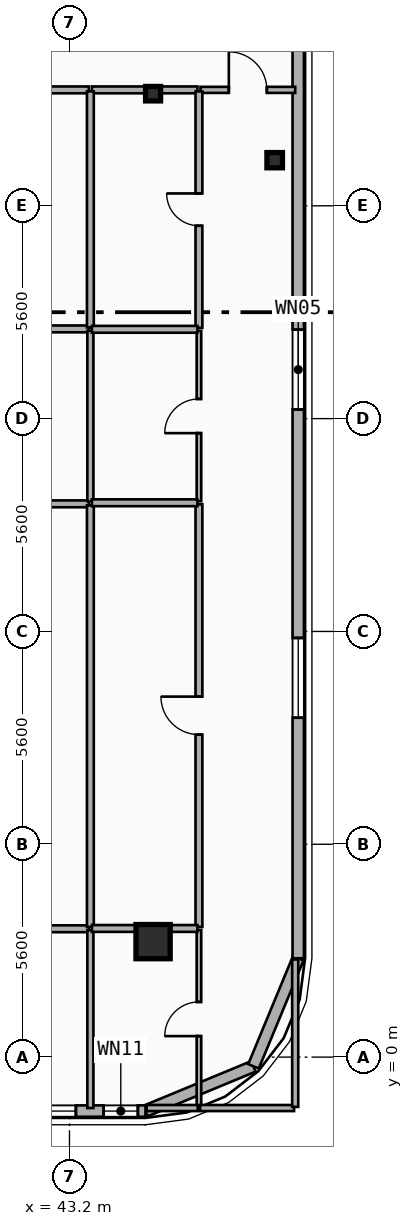
"""IFC4 building model, lengths in metres.
Left out: names, types, materials, properties, quantities, classifications, styles, units other than length and angle.
Written with IfcOpenShell. Run it as: python <this file> out.ifc"""

import sys

from ifc_helpers import new_model, si_unit, direction, frame, frame_2d, origin, origin_2d, place, context, subcontext, project, spatial, rectangle, i_section, extrude, element, fill, save


model = new_model("IFC4")
c1 = context("Model", 3, precision=1e-05, world=origin(), true_north=direction((0.0, 1.0)))
c2 = subcontext(c1, "Body", "Model", "MODEL_VIEW")
j1 = project(units=[si_unit("LENGTHUNIT", "METRE"), si_unit("PLANEANGLEUNIT", "RADIAN")], contexts=[c1])
p1 = place(None, origin())
s1 = spatial("IfcSite", under=j1, at=p1, CompositionType="ELEMENT")
p2 = place(p1, origin())
s2 = spatial("IfcBuilding", under=s1, at=p2, CompositionType="ELEMENT")
p3 = place(p2, frame((0.0, 0.0, 254.7)))
s3 = spatial("IfcBuildingStorey", under=s2, at=p3, CompositionType="ELEMENT", Elevation=254.7)
p4 = place(p3, frame((45.4, 25.35, 0.0), z_axis=(0.0, 0.0, 1.0), x_axis=(1.0, 0.0, 0.0)))
e1 = element("IfcColumn", 1, at=p4, inside=s3, PredefinedType="COLUMN", context=c2, shape_type="SweptSolid", body=[
    extrude(i_section(OverallWidth=0.395, OverallDepth=0.38, WebThickness=0.019, FlangeThickness=0.03, FilletRadius=0.015, at=origin_2d()), origin(), (0.0, 0.0, 1.0), 3.7),
])
p5 = place(p3, frame((45.4, 3.147, 0.0), z_axis=(0.0, -0.090292812226, 0.995915261486), x_axis=(1.0, 0.0, 0.0)))
e2 = element("IfcColumn", 2, at=p5, inside=s3, PredefinedType="COLUMN", context=c2, shape_type="SweptSolid", body=[
    extrude(rectangle(XDim=0.9, YDim=0.9, at=origin_2d()), origin(), (0.0, 0.0, 1.0), 3.715),
])
p6 = place(p3, frame((48.6, 23.6, 0.0), z_axis=(0.0, 0.0, 1.0), x_axis=(1.0, 0.0, 0.0)))
e3 = element("IfcColumn", 3, at=p6, inside=s3, PredefinedType="COLUMN", context=c2, shape_type="SweptSolid", body=[
    extrude(i_section(OverallWidth=0.408, OverallDepth=0.4, WebThickness=0.025, FlangeThickness=0.039, FilletRadius=0.015, at=origin_2d()), origin(), (0.0, 0.0, 1.0), 3.7),
])
p7 = place(p3, frame((48.042, -0.243, 0.0), z_axis=(0.0, 0.0, 1.0), x_axis=(-0.92389884758, -0.382636798336, 0.0)))
e4 = element("IfcWall", 4, at=p7, inside=s3, PredefinedType="SOLIDWALL", context=c2, shape_type="SweptSolid", body=[
    extrude(rectangle(XDim=3.077, YDim=0.3, at=frame_2d((1.538, 0.0))), origin(), (0.0, 0.0, 1.0), 3.42),
])
p8 = place(p3, frame((49.22, 2.6, 0.0), z_axis=(0.0, 0.0, 1.0), x_axis=(-0.382676475685, -0.923882414032, 0.0)))
e5 = element("IfcWall", 5, at=p8, inside=s3, PredefinedType="SOLIDWALL", context=c2, shape_type="SweptSolid", body=[
    extrude(rectangle(XDim=3.077, YDim=0.3, at=frame_2d((1.539, 0.0))), origin(), (0.0, 0.0, 1.0), 3.42),
])
p9 = place(p3, frame((49.22, 36.8, 0.0), z_axis=(0.0, 0.0, 1.0), x_axis=(0.0, -1.0, 0.0)))
e6 = element("IfcWall", 6, at=p9, inside=s3, PredefinedType="SOLIDWALL", context=c2, shape_type="SweptSolid", body=[
    extrude(rectangle(XDim=34.2, YDim=0.3, at=frame_2d((17.1, 0.0))), origin(), (0.0, 0.0, 1.0), 3.42),
])
p10 = place(p9, frame((17.66, 0.0, 0.75)))
e7 = element("IfcOpeningElement", 7, at=p10, cuts=e6, PredefinedType="OPENING", context=c2, shape_type="SweptSolid", body=[
    extrude(rectangle(XDim=2.1, YDim=2.1, at=frame_2d((1.05, 1.05))), frame((0.0, 0.16, 0.0), z_axis=(0.0, -1.0, 0.0), x_axis=(1.0, 0.0, 0.0)), (0.0, 0.0, 1.0), 0.32),
])
p11 = place(p9, frame((25.77, 0.0, 0.75)))
e8 = element("IfcOpeningElement", 8, at=p11, cuts=e6, PredefinedType="OPENING", context=c2, shape_type="SweptSolid", body=[
    extrude(rectangle(XDim=2.1, YDim=2.1, at=frame_2d((1.05, 1.05))), frame((0.0, 0.16, 0.0), z_axis=(0.0, -1.0, 0.0), x_axis=(1.0, 0.0, 0.0)), (0.0, 0.0, 1.0), 0.32),
])
p12 = place(p3, frame((45.2, -1.42, 0.0), z_axis=(0.0, 0.0, 1.0), x_axis=(-1.0, 0.0, 0.0)))
e9 = element("IfcWall", 9, at=p12, inside=s3, PredefinedType="SOLIDWALL", context=c2, shape_type="SweptSolid", body=[
    extrude(rectangle(XDim=32.8, YDim=0.3, at=frame_2d((16.4, 0.0))), origin(), (0.0, 0.0, 1.0), 3.42),
])
p13 = place(p12, frame((26.77, 0.0, 0.75)))
e10 = element("IfcOpeningElement", 10, at=p13, cuts=e9, PredefinedType="OPENING", context=c2, shape_type="SweptSolid", body=[
    extrude(rectangle(XDim=1.6, YDim=1.95, at=frame_2d((0.8, 0.975))), frame((0.0, 0.16, 0.0), z_axis=(0.0, -1.0, 0.0), x_axis=(1.0, 0.0, 0.0)), (0.0, 0.0, 1.0), 0.32),
])
p14 = place(p12, frame((29.115, 0.0, 0.75)))
e11 = element("IfcOpeningElement", 11, at=p14, cuts=e9, PredefinedType="OPENING", context=c2, shape_type="SweptSolid", body=[
    extrude(rectangle(XDim=2.1, YDim=2.1, at=frame_2d((1.05, 1.05))), frame((0.0, 0.16, 0.0), z_axis=(0.0, -1.0, 0.0), x_axis=(1.0, 0.0, 0.0)), (0.0, 0.0, 1.0), 0.32),
])
p15 = place(p12, frame((15.75, 0.0, 0.75)))
e12 = element("IfcOpeningElement", 12, at=p15, cuts=e9, PredefinedType="OPENING", context=c2, shape_type="SweptSolid", body=[
    extrude(rectangle(XDim=2.1, YDim=2.1, at=frame_2d((1.05, 1.05))), frame((0.0, 0.16, 0.0), z_axis=(0.0, -1.0, 0.0), x_axis=(1.0, 0.0, 0.0)), (0.0, 0.0, 1.0), 0.32),
])
p16 = place(p12, frame((4.681, 0.0, 0.8)))
e13 = element("IfcOpeningElement", 13, at=p16, cuts=e9, PredefinedType="OPENING", context=c2, shape_type="SweptSolid", body=[
    extrude(rectangle(XDim=1.8, YDim=1.8, at=frame_2d((0.9, 0.9))), frame((0.0, 0.16, 0.0), z_axis=(0.0, -1.0, 0.0), x_axis=(1.0, 0.0, 0.0)), (0.0, 0.0, 1.0), 0.32),
])
p17 = place(p12, frame((1.831, 0.0, 0.75)))
e14 = element("IfcOpeningElement", 14, at=p17, cuts=e9, PredefinedType="OPENING", context=c2, shape_type="SweptSolid", body=[
    extrude(rectangle(XDim=2.1, YDim=2.1, at=frame_2d((1.05, 1.05))), frame((0.0, 0.16, 0.0), z_axis=(0.0, -1.0, 0.0), x_axis=(1.0, 0.0, 0.0)), (0.0, 0.0, 1.0), 0.32),
])
p18 = place(p12, frame((0.2, 0.0, 0.9)))
e15 = element("IfcOpeningElement", 15, at=p18, cuts=e9, PredefinedType="OPENING", context=c2, shape_type="SweptSolid", body=[
    extrude(rectangle(XDim=0.9, YDim=1.05, at=frame_2d((0.45, 0.525))), frame((0.0, 0.16, 0.0), z_axis=(0.0, -1.0, 0.0), x_axis=(1.0, 0.0, 0.0)), (0.0, 0.0, 1.0), 0.32),
])
p19 = place(p12, frame((31.76, 0.0, 0.9)))
e16 = element("IfcOpeningElement", 16, at=p19, cuts=e9, PredefinedType="OPENING", context=c2, shape_type="SweptSolid", body=[
    extrude(rectangle(XDim=0.9, YDim=1.05, at=frame_2d((0.45, 0.525))), frame((0.0, 0.16, 0.0), z_axis=(0.0, -1.0, 0.0), x_axis=(1.0, 0.0, 0.0)), (0.0, 0.0, 1.0), 0.32),
])
p20 = place(p3, frame((40.928, 25.45, 0.0), z_axis=(0.0, 0.0, 1.0), x_axis=(1.0, 0.0, 0.0)))
e17 = element("IfcWall", 17, at=p20, inside=s3, PredefinedType="PLUMBINGWALL", context=c2, shape_type="SweptSolid", body=[
    extrude(rectangle(XDim=2.782, YDim=0.18, at=frame_2d((1.391, 0.0))), origin(), (0.0, 0.0, 1.0), 3.42),
])
p21 = place(p3, frame((46.647, 25.45, 0.0), z_axis=(0.0, 0.0, 1.0), x_axis=(1.0, 0.0, 0.0)))
e18 = element("IfcWall", 18, at=p21, inside=s3, PredefinedType="PARTITIONING", context=c2, shape_type="SweptSolid", body=[
    extrude(rectangle(XDim=2.493, YDim=0.16, at=frame_2d((1.247, 0.0))), origin(), (0.0, 0.0, 1.0), 3.42),
])
p22 = place(p21, frame((0.747, 0.0, 0.0)))
e19 = element("IfcOpeningElement", 19, at=p22, cuts=e18, PredefinedType="OPENING", context=c2, shape_type="SweptSolid", body=[
    extrude(rectangle(XDim=1.0, YDim=2.15, at=frame_2d((0.5, 1.075))), frame((0.0, 0.09, 0.0), z_axis=(0.0, -1.0, 0.0), x_axis=(1.0, 0.0, 0.0)), (0.0, 0.0, 1.0), 0.18),
])
p23 = place(p3, frame((43.79, 25.45, 0.0), z_axis=(0.0, 0.0, 1.0), x_axis=(1.0, 0.0, 0.0)))
e20 = element("IfcWall", 20, at=p23, inside=s3, PredefinedType="PLUMBINGWALL", context=c2, shape_type="SweptSolid", body=[
    extrude(rectangle(XDim=2.777, YDim=0.18, at=frame_2d((1.388, 0.0))), origin(), (0.0, 0.0, 1.0), 2.7),
])
p24 = place(p3, frame((40.928, 3.377, 0.0), z_axis=(0.0, 0.0, 1.0), x_axis=(1.0, 0.0, 0.0)))
e21 = element("IfcWall", 21, at=p24, inside=s3, PredefinedType="PLUMBINGWALL", context=c2, shape_type="SweptSolid", body=[
    extrude(rectangle(XDim=2.782, YDim=0.18, at=frame_2d((1.391, 0.0))), origin(), (0.0, 0.0, 1.0), 3.08),
])
p25 = place(p3, frame((43.75, -1.34, 0.0), z_axis=(0.0, 0.0, 1.0), x_axis=(0.0, 1.0, 0.0)))
e22 = element("IfcWall", 22, at=p25, inside=s3, PredefinedType="PARTITIONING", context=c2, shape_type="SweptSolid", body=[
    extrude(rectangle(XDim=4.677, YDim=0.16, at=frame_2d((2.338, 0.0))), origin(), (0.0, 0.0, 1.0), 3.08),
])
p26 = place(p3, frame((40.928, 14.558, 0.0), z_axis=(0.0, 0.0, 1.0), x_axis=(1.0, 0.0, 0.0)))
e23 = element("IfcWall", 23, at=p26, inside=s3, PredefinedType="PLUMBINGWALL", context=c2, shape_type="SweptSolid", body=[
    extrude(rectangle(XDim=2.782, YDim=0.18, at=frame_2d((1.391, 0.0))), origin(), (0.0, 0.0, 1.0), 2.9),
])
p27 = place(p3, frame((43.75, 3.425, 0.0), z_axis=(0.0, 0.0, 1.0), x_axis=(0.0, 1.0, 0.0)))
e24 = element("IfcWall", 24, at=p27, inside=s3, PredefinedType="PLUMBINGWALL", context=c2, shape_type="SweptSolid", body=[
    extrude(rectangle(XDim=11.093, YDim=0.18, at=frame_2d((5.546, 0.0))), origin(), (0.0, 0.0, 1.0), 2.9),
])
p28 = place(p3, frame((40.928, 19.161, 0.0), z_axis=(0.0, 0.0, 1.0), x_axis=(1.0, 0.0, 0.0)))
e25 = element("IfcWall", 25, at=p28, inside=s3, PredefinedType="PLUMBINGWALL", context=c2, shape_type="SweptSolid", body=[
    extrude(rectangle(XDim=2.782, YDim=0.18, at=frame_2d((1.391, 0.0))), origin(), (0.0, 0.0, 1.0), 2.91),
])
p29 = place(p3, frame((43.75, 14.626, 0.0), z_axis=(0.0, 0.0, 1.0), x_axis=(0.0, 1.0, 0.0)))
e26 = element("IfcWall", 26, at=p29, inside=s3, PredefinedType="PARTITIONING", context=c2, shape_type="SweptSolid", body=[
    extrude(rectangle(XDim=4.484, YDim=0.16, at=frame_2d((2.242, 0.0))), origin(), (0.0, 0.0, 1.0), 2.9),
])
p30 = place(p3, frame((43.75, 19.201, 0.0), z_axis=(0.0, 0.0, 1.0), x_axis=(0.0, 1.0, 0.0)))
e27 = element("IfcWall", 27, at=p30, inside=s3, PredefinedType="PLUMBINGWALL", context=c2, shape_type="SweptSolid", body=[
    extrude(rectangle(XDim=6.209, YDim=0.18, at=frame_2d((3.104, 0.0))), origin(), (0.0, 0.0, 1.0), 2.9),
])
p31 = place(p3, frame((46.607, -1.34, 0.0), z_axis=(0.0, 0.0, 1.0), x_axis=(0.0, 1.0, 0.0)))
e28 = element("IfcWall", 28, at=p31, inside=s3, PredefinedType="PARTITIONING", context=c2, shape_type="SweptSolid", body=[
    extrude(rectangle(XDim=4.685, YDim=0.12, at=frame_2d((2.343, 0.0))), origin(), (0.0, 0.0, 1.0), 3.42),
])
p32 = place(p31, frame((1.893, 0.0, 0.0)))
e29 = element("IfcOpeningElement", 29, at=p32, cuts=e28, PredefinedType="OPENING", context=c2, shape_type="SweptSolid", body=[
    extrude(rectangle(XDim=0.9, YDim=2.1, at=frame_2d((0.45, 1.05))), frame((0.0, 0.07, 0.0), z_axis=(0.0, -1.0, 0.0), x_axis=(1.0, 0.0, 0.0)), (0.0, 0.0, 1.0), 0.14),
])
p33 = place(p3, frame((46.607, 3.425, 0.0), z_axis=(0.0, 0.0, 1.0), x_axis=(0.0, 1.0, 0.0)))
e30 = element("IfcWall", 30, at=p33, inside=s3, PredefinedType="PLUMBINGWALL", context=c2, shape_type="SweptSolid", body=[
    extrude(rectangle(XDim=11.121, YDim=0.18, at=frame_2d((5.561, 0.0))), origin(), (0.0, 0.0, 1.0), 3.42),
])
p34 = place(p33, frame((5.061, 0.0, 0.0)))
e31 = element("IfcOpeningElement", 31, at=p34, cuts=e30, PredefinedType="OPENING", context=c2, shape_type="SweptSolid", body=[
    extrude(rectangle(XDim=1.0, YDim=2.15, at=frame_2d((0.5, 1.075))), frame((0.0, 0.1, 0.0), z_axis=(0.0, -1.0, 0.0), x_axis=(1.0, 0.0, 0.0)), (0.0, 0.0, 1.0), 0.2),
])
p35 = place(p3, frame((46.607, 14.626, 0.0), z_axis=(0.0, 0.0, 1.0), x_axis=(0.0, 1.0, 0.0)))
e32 = element("IfcWall", 32, at=p35, inside=s3, PredefinedType="PARTITIONING", context=c2, shape_type="SweptSolid", body=[
    extrude(rectangle(XDim=4.484, YDim=0.12, at=frame_2d((2.242, 0.0))), origin(), (0.0, 0.0, 1.0), 3.42),
])
p36 = place(p35, frame((1.792, 0.0, 0.0)))
e33 = element("IfcOpeningElement", 33, at=p36, cuts=e32, PredefinedType="OPENING", context=c2, shape_type="SweptSolid", body=[
    extrude(rectangle(XDim=0.9, YDim=2.1, at=frame_2d((0.45, 1.05))), frame((0.0, 0.07, 0.0), z_axis=(0.0, -1.0, 0.0), x_axis=(1.0, 0.0, 0.0)), (0.0, 0.0, 1.0), 0.14),
])
p37 = place(p3, frame((46.607, 19.19, 0.0), z_axis=(0.0, 0.0, 1.0), x_axis=(0.0, 1.0, 0.0)))
e34 = element("IfcWall", 34, at=p37, inside=s3, PredefinedType="PLUMBINGWALL", context=c2, shape_type="SweptSolid", body=[
    extrude(rectangle(XDim=6.22, YDim=0.18, at=frame_2d((3.11, 0.0))), origin(), (0.0, 0.0, 1.0), 2.9),
])
p38 = place(p37, frame((2.685, 0.0, 0.0)))
e35 = element("IfcOpeningElement", 35, at=p38, cuts=e34, PredefinedType="OPENING", context=c2, shape_type="SweptSolid", body=[
    extrude(rectangle(XDim=0.85, YDim=2.1, at=frame_2d((0.425, 1.05))), frame((0.0, 0.1, 0.0), z_axis=(0.0, -1.0, 0.0), x_axis=(1.0, 0.0, 0.0)), (0.0, 0.0, 1.0), 0.2),
])
for number, where, z_axis, x_axis in (
    (36, (43.79, 3.385, 0.0), (0.0, 0.0, 1.0), (1.0, 0.0, 0.0)),
    (37, (43.79, 14.586, 0.0), (0.0, 0.0, 1.0), (1.0, 0.0, 0.0)),
    (38, (43.79, 19.15, 0.0), (0.0, 0.0, 1.0), (1.0, 0.0, 0.0)),
):
    element("IfcWall", number, at=place(p3, frame(where, z_axis=z_axis, x_axis=x_axis)), inside=s3, PredefinedType="PLUMBINGWALL", context=c2, shape_type="SweptSolid", body=[
        extrude(rectangle(XDim=2.777, YDim=0.18, at=frame_2d((1.388, 0.0))), origin(), (0.0, 0.0, 1.0), 2.7),
    ])
p39 = place(p3, frame((46.637, -1.34, 0.0), z_axis=(0.0, 0.0, 1.0), x_axis=(1.0, 0.0, 0.0)))
e39 = element("IfcWall", 39, at=p39, inside=s3, PredefinedType="PARTITIONING", context=c2, shape_type="SweptSolid", body=[
    extrude(rectangle(XDim=2.473, YDim=0.16, at=frame_2d((1.237, 0.0))), origin(), (0.0, 0.0, 1.0), 3.42),
])
p40 = place(p3, frame((49.14, -1.31, 0.0), z_axis=(0.0, 0.0, 1.0), x_axis=(0.0, 1.0, 0.0)))
e40 = element("IfcWall", 40, at=p40, inside=s3, PredefinedType="PARTITIONING", context=c2, shape_type="SweptSolid", body=[
    extrude(rectangle(XDim=3.88, YDim=0.16, at=frame_2d((1.94, 0.0))), origin(), (0.0, 0.0, 1.0), 3.42),
])
p41 = place(p3, frame((45.23, -1.34, 0.0), z_axis=(0.0, 0.0, 1.0), x_axis=(1.0, 0.0, 0.0)))
e41 = element("IfcWall", 41, at=p41, inside=s3, PredefinedType="PARTITIONING", context=c2, shape_type="SweptSolid", body=[
    extrude(rectangle(XDim=1.347, YDim=0.16, at=frame_2d((0.673, 0.0))), origin(), (0.0, 0.0, 1.0), 3.42),
])
p42 = place(p10, origin())
e42 = element("IfcWindow", 42, at=p42, inside=s3, PartitioningType="SINGLE_PANEL", PredefinedType="WINDOW", context=c2, shape_type="SweptSolid", body=[
    extrude(rectangle(XDim=2.1, YDim=2.1, at=frame_2d((1.05, 1.05))), frame((0.0, 0.03, 0.0), z_axis=(0.0, -1.0, 0.0), x_axis=(1.0, 0.0, 0.0)), (0.0, 0.0, 1.0), 0.06),
])
fill(e7, e42)
p43 = place(p11, origin())
e43 = element("IfcWindow", 43, at=p43, inside=s3, PartitioningType="SINGLE_PANEL", PredefinedType="WINDOW", context=c2, shape_type="SweptSolid", body=[
    extrude(rectangle(XDim=2.1, YDim=2.1, at=frame_2d((1.05, 1.05))), frame((0.0, 0.03, 0.0), z_axis=(0.0, -1.0, 0.0), x_axis=(1.0, 0.0, 0.0)), (0.0, 0.0, 1.0), 0.06),
])
fill(e8, e43)
p44 = place(p17, origin())
e44 = element("IfcWindow", 44, at=p44, inside=s3, PartitioningType="SINGLE_PANEL", PredefinedType="WINDOW", context=c2, shape_type="SweptSolid", body=[
    extrude(rectangle(XDim=2.1, YDim=2.1, at=frame_2d((1.05, 1.05))), frame((0.0, 0.03, 0.0), z_axis=(0.0, -1.0, 0.0), x_axis=(1.0, 0.0, 0.0)), (0.0, 0.0, 1.0), 0.06),
])
fill(e14, e44)
p45 = place(p18, origin())
e45 = element("IfcWindow", 45, at=p45, inside=s3, PartitioningType="SINGLE_PANEL", PredefinedType="WINDOW", context=c2, shape_type="SweptSolid", body=[
    extrude(rectangle(XDim=0.9, YDim=1.05, at=frame_2d((0.45, 0.525))), frame((0.0, 0.03, 0.0), z_axis=(0.0, -1.0, 0.0), x_axis=(1.0, 0.0, 0.0)), (0.0, 0.0, 1.0), 0.06),
])
fill(e15, e45)
p46 = place(p22, origin())
e46 = element("IfcDoor", 46, at=p46, inside=s3, OperationType="SINGLE_SWING_LEFT", PredefinedType="DOOR", context=c2, shape_type="SweptSolid", body=[
    extrude(rectangle(XDim=1.0, YDim=2.15, at=frame_2d((0.5, 1.075))), frame((0.0, 0.025, 0.0), z_axis=(0.0, -1.0, 0.0), x_axis=(1.0, 0.0, 0.0)), (0.0, 0.0, 1.0), 0.05),
])
fill(e19, e46)
p47 = place(p32, origin())
e47 = element("IfcDoor", 47, at=p47, inside=s3, OperationType="SINGLE_SWING_LEFT", PredefinedType="DOOR", context=c2, shape_type="SweptSolid", body=[
    extrude(rectangle(XDim=0.9, YDim=2.1, at=frame_2d((0.45, 1.05))), frame((0.0, 0.025, 0.0), z_axis=(0.0, -1.0, 0.0), x_axis=(1.0, 0.0, 0.0)), (0.0, 0.0, 1.0), 0.05),
])
fill(e29, e47)
p48 = place(p34, origin())
e48 = element("IfcDoor", 48, at=p48, inside=s3, OperationType="SINGLE_SWING_RIGHT", PredefinedType="DOOR", context=c2, shape_type="SweptSolid", body=[
    extrude(rectangle(XDim=1.0, YDim=2.15, at=frame_2d((0.5, 1.075))), frame((0.0, 0.025, 0.0), z_axis=(0.0, -1.0, 0.0), x_axis=(1.0, 0.0, 0.0)), (0.0, 0.0, 1.0), 0.05),
])
fill(e31, e48)
p49 = place(p36, origin())
e49 = element("IfcDoor", 49, at=p49, inside=s3, OperationType="SINGLE_SWING_LEFT", PredefinedType="DOOR", context=c2, shape_type="SweptSolid", body=[
    extrude(rectangle(XDim=0.9, YDim=2.1, at=frame_2d((0.45, 1.05))), frame((0.0, 0.025, 0.0), z_axis=(0.0, -1.0, 0.0), x_axis=(1.0, 0.0, 0.0)), (0.0, 0.0, 1.0), 0.05),
])
fill(e33, e49)
p50 = place(p38, origin())
e50 = element("IfcDoor", 50, at=p50, inside=s3, OperationType="SINGLE_SWING_RIGHT", PredefinedType="DOOR", context=c2, shape_type="SweptSolid", body=[
    extrude(rectangle(XDim=0.85, YDim=2.1, at=frame_2d((0.425, 1.05))), frame((0.0, 0.025, 0.0), z_axis=(0.0, -1.0, 0.0), x_axis=(1.0, 0.0, 0.0)), (0.0, 0.0, 1.0), 0.05),
])
fill(e35, e50)
save(model, sys.argv[1])
